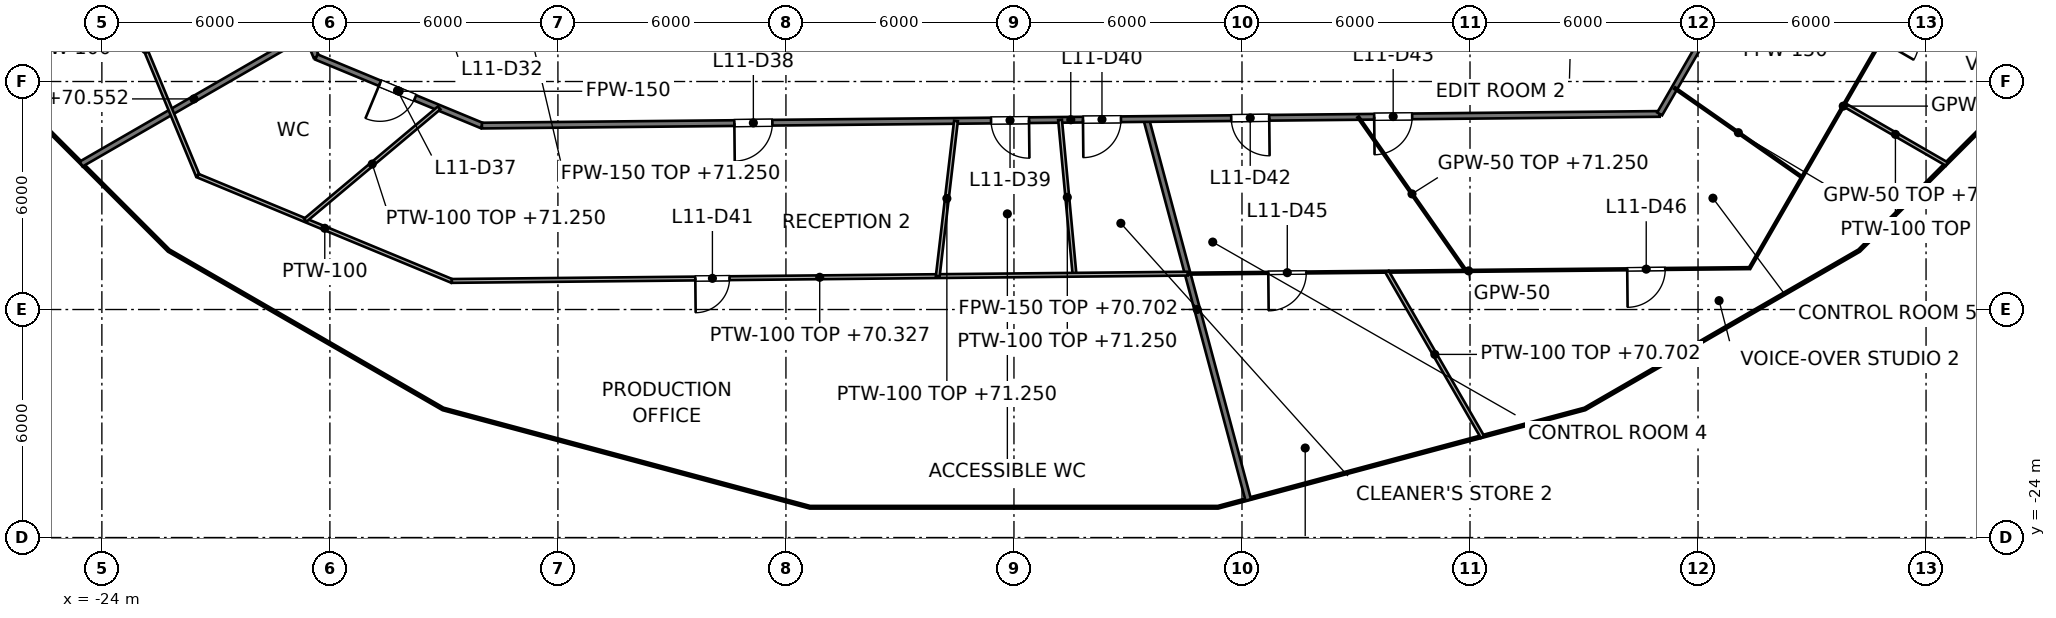
"""IFC4 building model, lengths in metres.
Left out: names, types, materials, properties, quantities, classifications, styles, units other than length and angle.
Written with IfcOpenShell. Run it as: python <this file> out.ifc"""

import sys

from ifc_helpers import new_model, si_unit, direction, frame, frame_2d, origin, place, context, subcontext, project, spatial, rectangle, extrude, element, fill, save


model = new_model("IFC4")
c1 = context("Model", 3, precision=1e-05, world=origin(), true_north=direction((0.0, 1.0)))
c2 = subcontext(c1, "Body", "Model", "MODEL_VIEW")
j1 = project(units=[si_unit("LENGTHUNIT", "METRE"), si_unit("PLANEANGLEUNIT", "RADIAN")], contexts=[c1])
p1 = place(None, origin())
s1 = spatial("IfcSite", under=j1, at=p1, CompositionType="ELEMENT")
p2 = place(p1, origin())
s2 = spatial("IfcBuilding", under=s1, at=p2, CompositionType="ELEMENT")
p3 = place(p2, frame((0.0, 0.0, 67.2)))
s3 = spatial("IfcBuildingStorey", under=s2, at=p3, CompositionType="ELEMENT", Elevation=67.2)
p4 = place(p3, frame((3.48, -12.987, 0.0), z_axis=(0.0, 0.0, 1.0), x_axis=(0.25876666307, -0.96593986049, 0.0)))
e1 = element("IfcWall", 1, at=p4, inside=s3, PredefinedType="PARTITIONING", context=c2, shape_type="SweptSolid", body=[
    extrude(rectangle(XDim=10.376, YDim=0.15, at=frame_2d((5.188, 0.0))), origin(), (0.0, 0.0, 1.0), 3.502),
])
p5 = place(p3, frame((-20.15, -7.025, 0.0), z_axis=(0.0, 0.0, 1.0), x_axis=(0.382713655067, -0.923867013279, 0.0)))
e2 = element("IfcWall", 2, at=p5, inside=s3, PredefinedType="PARTITIONING", context=c2, shape_type="SweptSolid", body=[
    extrude(rectangle(XDim=4.688, YDim=0.15, at=frame_2d((2.344, 0.0))), origin(), (0.0, 0.0, 1.0), 3.195),
])
p6 = place(p3, frame((-18.355, -11.355, 0.0), z_axis=(0.0, 0.0, 1.0), x_axis=(0.923864073191, -0.382720752334, 0.0)))
e3 = element("IfcWall", 3, at=p6, inside=s3, PredefinedType="PARTITIONING", context=c2, shape_type="SweptSolid", body=[
    extrude(rectangle(XDim=4.714, YDim=0.15, at=frame_2d((2.357, 0.0))), origin(), (0.0, 0.0, 1.0), 3.195),
])
p7 = place(p6, frame((1.81, 0.0, 0.0)))
e4 = element("IfcOpeningElement", 4, at=p7, cuts=e3, PredefinedType="OPENING", context=c2, shape_type="SweptSolid", body=[
    extrude(rectangle(XDim=1.0, YDim=2.1, at=frame_2d((0.5, 1.05))), frame((0.0, 0.075, 0.0), z_axis=(0.0, -1.0, 0.0), x_axis=(1.0, 0.0, 0.0)), (0.0, 0.0, 1.0), 0.15),
])
p8 = place(p3, frame((-14.0, -13.16, 0.0), z_axis=(0.0, 0.0, 1.0), x_axis=(0.999950971812, 0.009902220598, 0.0)))
e5 = element("IfcWall", 5, at=p8, inside=s3, PredefinedType="PARTITIONING", context=c2, shape_type="SweptSolid", body=[
    extrude(rectangle(XDim=30.991, YDim=0.15, at=frame_2d((15.496, 0.0))), origin(), (0.0, 0.0, 1.0), 3.127),
])
p9 = place(p8, frame((6.643, 0.0, 0.0)))
e6 = element("IfcOpeningElement", 6, at=p9, cuts=e5, PredefinedType="OPENING", context=c2, shape_type="SweptSolid", body=[
    extrude(rectangle(XDim=1.0, YDim=2.1, at=frame_2d((0.5, 1.05))), frame((0.0, 0.075, 0.0), z_axis=(0.0, -1.0, 0.0), x_axis=(1.0, 0.0, 0.0)), (0.0, 0.0, 1.0), 0.15),
])
p10 = place(p8, frame((13.397, 0.0, 0.0)))
e7 = element("IfcOpeningElement", 7, at=p10, cuts=e5, PredefinedType="OPENING", context=c2, shape_type="SweptSolid", body=[
    extrude(rectangle(XDim=1.0, YDim=2.1, at=frame_2d((0.5, 1.05))), frame((0.0, 0.075, 0.0), z_axis=(0.0, -1.0, 0.0), x_axis=(1.0, 0.0, 0.0)), (0.0, 0.0, 1.0), 0.15),
])
p11 = place(p8, frame((15.816, 0.0, 0.0)))
e8 = element("IfcOpeningElement", 8, at=p11, cuts=e5, PredefinedType="OPENING", context=c2, shape_type="SweptSolid", body=[
    extrude(rectangle(XDim=1.0, YDim=2.1, at=frame_2d((0.5, 1.05))), frame((0.0, 0.075, 0.0), z_axis=(0.0, -1.0, 0.0), x_axis=(1.0, 0.0, 0.0)), (0.0, 0.0, 1.0), 0.15),
])
p12 = place(p8, frame((19.718, 0.0, 0.0)))
e9 = element("IfcOpeningElement", 9, at=p12, cuts=e5, PredefinedType="OPENING", context=c2, shape_type="SweptSolid", body=[
    extrude(rectangle(XDim=1.0, YDim=2.1, at=frame_2d((0.5, 1.05))), frame((0.0, 0.075, 0.0), z_axis=(0.0, -1.0, 0.0), x_axis=(1.0, 0.0, 0.0)), (0.0, 0.0, 1.0), 0.15),
])
p13 = place(p8, frame((23.479, 0.0, 0.0)))
e10 = element("IfcOpeningElement", 10, at=p13, cuts=e5, PredefinedType="OPENING", context=c2, shape_type="SweptSolid", body=[
    extrude(rectangle(XDim=1.0, YDim=2.1, at=frame_2d((0.5, 1.05))), frame((0.0, 0.075, 0.0), z_axis=(0.0, -1.0, 0.0), x_axis=(1.0, 0.0, 0.0)), (0.0, 0.0, 1.0), 0.15),
])
p14 = place(p3, frame((-24.546, -14.172, 0.0), z_axis=(0.0, 0.0, 1.0), x_axis=(0.866030233461, 0.499991634662, 0.0)))
e11 = element("IfcWall", 11, at=p14, inside=s3, PredefinedType="PARTITIONING", context=c2, shape_type="SweptSolid", body=[
    extrude(rectangle(XDim=6.856, YDim=0.15, at=frame_2d((3.428, 0.0))), origin(), (0.0, 0.0, 1.0), 3.352),
])
p15 = place(p3, frame((16.99, -12.853, 0.0), z_axis=(0.0, 0.0, 1.0), x_axis=(0.500026252906, 0.866010246132, 0.0)))
e12 = element("IfcWall", 12, at=p15, inside=s3, PredefinedType="PARTITIONING", context=c2, shape_type="SweptSolid", body=[
    extrude(rectangle(XDim=6.377, YDim=0.15, at=frame_2d((3.188, 0.0))), origin(), (0.0, 0.0, 1.0), 3.195),
])
p16 = place(p15, frame((3.033, 0.0, 0.0)))
e13 = element("IfcOpeningElement", 13, at=p16, cuts=e12, PredefinedType="OPENING", context=c2, shape_type="SweptSolid", body=[
    extrude(rectangle(XDim=1.0, YDim=2.1, at=frame_2d((0.5, 1.05))), frame((0.0, 0.075, 0.0), z_axis=(0.0, -1.0, 0.0), x_axis=(1.0, 0.0, 0.0)), (0.0, 0.0, 1.0), 0.15),
])
p17 = place(p3, frame((9.055, -12.932, 0.0), z_axis=(0.0, 0.0, 1.0), x_axis=(0.57356502665, -0.819160033329, 0.0)))
e14 = element("IfcWall", 14, at=p17, inside=s3, PredefinedType="PARTITIONING", context=c2, shape_type="SweptSolid", body=[
    extrude(rectangle(XDim=4.947, YDim=0.05, at=frame_2d((2.473, 0.0))), origin(), (0.0, 0.0, 1.0), 4.05),
])
p18 = place(p3, frame((17.383, -12.172, 0.0), z_axis=(0.0, 0.0, 1.0), x_axis=(0.819265519274, -0.573414343149, 0.0)))
e15 = element("IfcWall", 15, at=p18, inside=s3, PredefinedType="PARTITIONING", context=c2, shape_type="SweptSolid", body=[
    extrude(rectangle(XDim=4.096, YDim=0.05, at=frame_2d((2.048, 0.0))), origin(), (0.0, 0.0, 1.0), 4.05),
])
p19 = place(p3, frame((4.57, -17.056, 0.0), z_axis=(0.0, 0.0, 1.0), x_axis=(0.999951924398, 0.009805554158, 0.0)))
e16 = element("IfcWall", 16, at=p19, inside=s3, PredefinedType="PARTITIONING", context=c2, shape_type="SweptSolid", body=[
    extrude(rectangle(XDim=14.79, YDim=0.05, at=frame_2d((7.395, 0.0))), origin(), (0.0, 0.0, 1.0), 3.127),
])
p20 = place(p19, frame((2.122, 0.0, 0.0)))
e17 = element("IfcOpeningElement", 17, at=p20, cuts=e16, PredefinedType="OPENING", context=c2, shape_type="SweptSolid", body=[
    extrude(rectangle(XDim=1.0, YDim=2.1, at=frame_2d((0.5, 1.05))), frame((0.0, 0.025, 0.0), z_axis=(0.0, -1.0, 0.0), x_axis=(1.0, 0.0, 0.0)), (0.0, 0.0, 1.0), 0.05),
])
p21 = place(p19, frame((11.567, 0.0, 0.0)))
e18 = element("IfcOpeningElement", 18, at=p21, cuts=e16, PredefinedType="OPENING", context=c2, shape_type="SweptSolid", body=[
    extrude(rectangle(XDim=1.0, YDim=2.1, at=frame_2d((0.5, 1.05))), frame((0.0, 0.025, 0.0), z_axis=(0.0, -1.0, 0.0), x_axis=(1.0, 0.0, 0.0)), (0.0, 0.0, 1.0), 0.05),
])
p22 = place(p3, frame((19.359, -16.91, 0.0), z_axis=(0.0, 0.0, 1.0), x_axis=(0.500075948794, 0.865981550287, 0.0)))
e19 = element("IfcWall", 19, at=p22, inside=s3, PredefinedType="PARTITIONING", context=c2, shape_type="SweptSolid", body=[
    extrude(rectangle(XDim=9.844, YDim=0.05, at=frame_2d((4.922, 0.0))), origin(), (0.0, 0.0, 1.0), 3.195),
])
p23 = place(p22, frame((6.906, 0.0, 0.0)))
e20 = element("IfcOpeningElement", 20, at=p23, cuts=e19, PredefinedType="OPENING", context=c2, shape_type="SweptSolid", body=[
    extrude(rectangle(XDim=1.0, YDim=2.1, at=frame_2d((0.5, 1.05))), frame((0.0, 0.025, 0.0), z_axis=(0.0, -1.0, 0.0), x_axis=(1.0, 0.0, 0.0)), (0.0, 0.0, 1.0), 0.05),
])
p24 = place(p3, frame((1.213, -13.009, 0.0), z_axis=(0.0, 0.0, 1.0), x_axis=(0.093072888435, -0.995659297872, 0.0)))
e21 = element("IfcWall", 21, at=p24, inside=s3, PredefinedType="PARTITIONING", context=c2, shape_type="SweptSolid", body=[
    extrude(rectangle(XDim=4.095, YDim=0.1, at=frame_2d((2.047, 0.0))), origin(), (0.0, 0.0, 1.0), 4.05),
])
p25 = place(p3, frame((-24.23, -7.837, 0.0), z_axis=(0.0, 0.0, 1.0), x_axis=(0.383020677741, -0.923739768779, 0.0)))
e22 = element("IfcWall", 22, at=p25, inside=s3, PredefinedType="PARTITIONING", context=c2, shape_type="SweptSolid", body=[
    extrude(rectangle(XDim=7.188, YDim=0.1, at=frame_2d((3.594, 0.0))), origin(), (0.0, 0.0, 1.0), 3.195),
])
p26 = place(p3, frame((9.817, -17.004, 0.0), z_axis=(0.0, 0.0, 1.0), x_axis=(0.500055912884, -0.865993120059, 0.0)))
e23 = element("IfcWall", 23, at=p26, inside=s3, PredefinedType="PARTITIONING", context=c2, shape_type="SweptSolid", body=[
    extrude(rectangle(XDim=5.028, YDim=0.1, at=frame_2d((2.514, 0.0))), origin(), (0.0, 0.0, 1.0), 3.502),
])
p27 = place(p3, frame((21.842, -12.61, 0.0), z_axis=(0.0, 0.0, 1.0), x_axis=(0.865948598564, -0.500133006953, 0.0)))
e24 = element("IfcWall", 24, at=p27, inside=s3, PredefinedType="PARTITIONING", context=c2, shape_type="SweptSolid", body=[
    extrude(rectangle(XDim=3.123, YDim=0.1, at=frame_2d((1.562, 0.0))), origin(), (0.0, 0.0, 1.0), 3.352),
])
p28 = place(p3, frame((-21.477, -14.477, 0.0), z_axis=(0.0, 0.0, 1.0), x_axis=(0.923776176895, -0.382932859653, 0.0)))
e25 = element("IfcWall", 25, at=p28, inside=s3, PredefinedType="PARTITIONING", context=c2, shape_type="SweptSolid", body=[
    extrude(rectangle(XDim=7.236, YDim=0.1, at=frame_2d((3.618, 0.0))), origin(), (0.0, 0.0, 1.0), 3.195),
])
p29 = place(p3, frame((-14.793, -17.248, 0.0), z_axis=(0.0, 0.0, 1.0), x_axis=(0.99995089607, 0.009909866277, 0.0)))
e26 = element("IfcWall", 26, at=p29, inside=s3, PredefinedType="PARTITIONING", context=c2, shape_type="SweptSolid", body=[
    extrude(rectangle(XDim=19.364, YDim=0.1, at=frame_2d((9.682, 0.0))), origin(), (0.0, 0.0, 1.0), 3.127),
])
p30 = place(p29, frame((6.409, 0.0, 0.0)))
e27 = element("IfcOpeningElement", 27, at=p30, cuts=e26, PredefinedType="OPENING", context=c2, shape_type="SweptSolid", body=[
    extrude(rectangle(XDim=0.9, YDim=2.1, at=frame_2d((0.45, 1.05))), frame((0.0, 0.05, 0.0), z_axis=(0.0, -1.0, 0.0), x_axis=(1.0, 0.0, 0.0)), (0.0, 0.0, 1.0), 0.1),
])
p31 = place(p3, frame((-18.647, -15.65, 0.0), z_axis=(0.0, 0.0, 1.0), x_axis=(0.765988260728, 0.642854559312, 0.0)))
e28 = element("IfcWall", 28, at=p31, inside=s3, PredefinedType="PARTITIONING", context=c2, shape_type="SweptSolid", body=[
    extrude(rectangle(XDim=4.598, YDim=0.1, at=frame_2d((2.299, 0.0))), origin(), (0.0, 0.0, 1.0), 4.05),
])
p32 = place(p3, frame((-2.005, -17.121, 0.0), z_axis=(0.0, 0.0, 1.0), x_axis=(0.116489865453, 0.993191880377, 0.0)))
e29 = element("IfcWall", 29, at=p32, inside=s3, PredefinedType="PARTITIONING", context=c2, shape_type="SweptSolid", body=[
    extrude(rectangle(XDim=4.112, YDim=0.1, at=frame_2d((2.056, 0.0))), origin(), (0.0, 0.0, 1.0), 4.05),
])
p33 = place(p7, origin())
e30 = element("IfcDoor", 30, at=p33, inside=s3, OperationType="SINGLE_SWING_LEFT", PredefinedType="DOOR", context=c2, shape_type="SweptSolid", body=[
    extrude(rectangle(XDim=1.0, YDim=2.1, at=frame_2d((0.5, 1.05))), frame((0.0, 0.025, 0.0), z_axis=(0.0, -1.0, 0.0), x_axis=(1.0, 0.0, 0.0)), (0.0, 0.0, 1.0), 0.05),
])
fill(e4, e30)
p34 = place(p9, origin())
e31 = element("IfcDoor", 31, at=p34, inside=s3, OperationType="SINGLE_SWING_LEFT", PredefinedType="DOOR", context=c2, shape_type="SweptSolid", body=[
    extrude(rectangle(XDim=1.0, YDim=2.1, at=frame_2d((0.5, 1.05))), frame((0.0, 0.025, 0.0), z_axis=(0.0, -1.0, 0.0), x_axis=(1.0, 0.0, 0.0)), (0.0, 0.0, 1.0), 0.05),
])
fill(e6, e31)
p35 = place(p10, origin())
e32 = element("IfcDoor", 32, at=p35, inside=s3, OperationType="SINGLE_SWING_RIGHT", PredefinedType="DOOR", context=c2, shape_type="SweptSolid", body=[
    extrude(rectangle(XDim=1.0, YDim=2.1, at=frame_2d((0.5, 1.05))), frame((0.0, 0.025, 0.0), z_axis=(0.0, -1.0, 0.0), x_axis=(1.0, 0.0, 0.0)), (0.0, 0.0, 1.0), 0.05),
])
fill(e7, e32)
p36 = place(p11, origin())
e33 = element("IfcDoor", 33, at=p36, inside=s3, OperationType="SINGLE_SWING_LEFT", PredefinedType="DOOR", context=c2, shape_type="SweptSolid", body=[
    extrude(rectangle(XDim=1.0, YDim=2.1, at=frame_2d((0.5, 1.05))), frame((0.0, 0.025, 0.0), z_axis=(0.0, -1.0, 0.0), x_axis=(1.0, 0.0, 0.0)), (0.0, 0.0, 1.0), 0.05),
])
fill(e8, e33)
p37 = place(p30, origin())
e34 = element("IfcDoor", 34, at=p37, inside=s3, OperationType="SINGLE_SWING_LEFT", PredefinedType="DOOR", context=c2, shape_type="SweptSolid", body=[
    extrude(rectangle(XDim=0.9, YDim=2.1, at=frame_2d((0.45, 1.05))), frame((0.0, 0.025, 0.0), z_axis=(0.0, -1.0, 0.0), x_axis=(1.0, 0.0, 0.0)), (0.0, 0.0, 1.0), 0.05),
])
fill(e27, e34)
p38 = place(p12, origin())
e35 = element("IfcDoor", 35, at=p38, inside=s3, OperationType="SINGLE_SWING_RIGHT", PredefinedType="DOOR", context=c2, shape_type="SweptSolid", body=[
    extrude(rectangle(XDim=1.0, YDim=2.1, at=frame_2d((0.5, 1.05))), frame((0.0, 0.025, 0.0), z_axis=(0.0, -1.0, 0.0), x_axis=(1.0, 0.0, 0.0)), (0.0, 0.0, 1.0), 0.05),
])
fill(e9, e35)
p39 = place(p13, origin())
e36 = element("IfcDoor", 36, at=p39, inside=s3, OperationType="SINGLE_SWING_LEFT", PredefinedType="DOOR", context=c2, shape_type="SweptSolid", body=[
    extrude(rectangle(XDim=1.0, YDim=2.1, at=frame_2d((0.5, 1.05))), frame((0.0, 0.025, 0.0), z_axis=(0.0, -1.0, 0.0), x_axis=(1.0, 0.0, 0.0)), (0.0, 0.0, 1.0), 0.05),
])
fill(e10, e36)
p40 = place(p20, origin())
e37 = element("IfcDoor", 37, at=p40, inside=s3, OperationType="SINGLE_SWING_LEFT", PredefinedType="DOOR", context=c2, shape_type="SweptSolid", body=[
    extrude(rectangle(XDim=1.0, YDim=2.1, at=frame_2d((0.5, 1.05))), frame((0.0, 0.025, 0.0), z_axis=(0.0, -1.0, 0.0), x_axis=(1.0, 0.0, 0.0)), (0.0, 0.0, 1.0), 0.05),
])
fill(e17, e37)
p41 = place(p21, origin())
e38 = element("IfcDoor", 38, at=p41, inside=s3, OperationType="SINGLE_SWING_LEFT", PredefinedType="DOOR", context=c2, shape_type="SweptSolid", body=[
    extrude(rectangle(XDim=1.0, YDim=2.1, at=frame_2d((0.5, 1.05))), frame((0.0, 0.025, 0.0), z_axis=(0.0, -1.0, 0.0), x_axis=(1.0, 0.0, 0.0)), (0.0, 0.0, 1.0), 0.05),
])
fill(e18, e38)
save(model, sys.argv[1])
